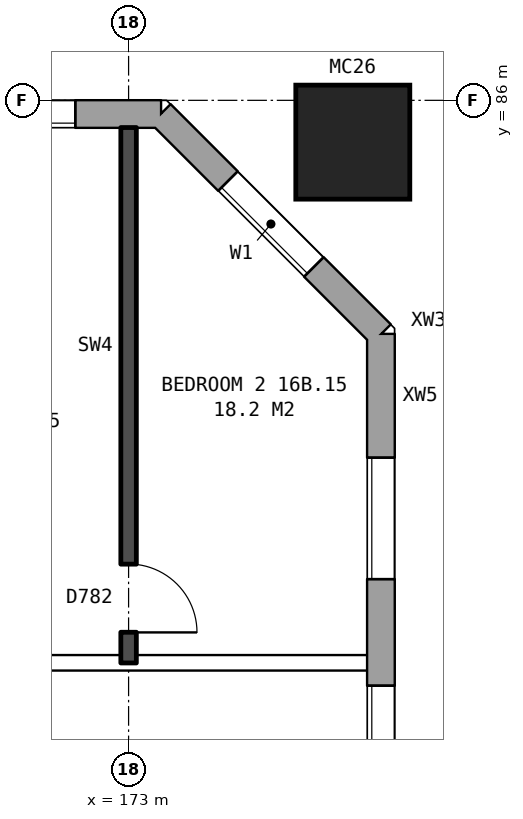
"""IFC4 building model, lengths in metres.
Left out: names, types, materials, properties, quantities, classifications, styles, units other than length and angle.
Written with IfcOpenShell. Run it as: python <this file> out.ifc"""

import sys

from ifc_helpers import new_model, si_unit, direction, frame, frame_2d, origin, origin_2d, place, context, subcontext, project, spatial, rectangle, hollow_rectangle, extrude, element, fill, save


model = new_model("IFC4")
c1 = context("Model", 3, precision=1e-05, world=origin(), true_north=direction((0.0, 1.0)))
c2 = subcontext(c1, "Body", "Model", "MODEL_VIEW")
j1 = project(units=[si_unit("LENGTHUNIT", "METRE"), si_unit("PLANEANGLEUNIT", "RADIAN")], contexts=[c1])
p1 = place(None, origin())
s1 = spatial("IfcSite", under=j1, at=p1, CompositionType="ELEMENT")
p2 = place(p1, origin())
s2 = spatial("IfcBuilding", under=s1, at=p2, CompositionType="ELEMENT")
p3 = place(p2, frame((0.0, 0.0, 59.8)))
s3 = spatial("IfcBuildingStorey", under=s2, at=p3, CompositionType="ELEMENT", Elevation=59.8)
p4 = place(p3, frame((175.95, 85.45, 0.0), z_axis=(0.0, 0.0, 1.0), x_axis=(1.0, 0.0, 0.0)))
e1 = element("IfcColumn", 1, at=p4, inside=s3, PredefinedType="COLUMN", context=c2, shape_type="SweptSolid", body=[
    extrude(hollow_rectangle(XDim=1.5, YDim=1.5, WallThickness=0.08, at=origin_2d()), origin(), (0.0, 0.0, 1.0), 3.1),
])
p5 = place(p3, frame((176.32, 57.075, 0.0), z_axis=(0.0, 0.0, 1.0), x_axis=(0.0, 1.0, 0.0)))
e2 = element("IfcWall", 2, at=p5, inside=s3, PredefinedType="STANDARD", context=c2, shape_type="SweptSolid", body=[
    extrude(rectangle(XDim=25.851, YDim=0.36, at=frame_2d((12.925, 0.0))), origin(), (0.0, 0.0, 1.0), 2.85),
])
p6 = place(p5, frame((1.625, 0.0, 0.8)))
e3 = element("IfcOpeningElement", 3, at=p6, cuts=e2, PredefinedType="OPENING", context=c2, shape_type="SweptSolid", body=[
    extrude(rectangle(XDim=1.6, YDim=1.8, at=frame_2d((0.8, 0.9))), frame((0.0, 0.19, 0.0), z_axis=(0.0, -1.0, 0.0), x_axis=(1.0, 0.0, 0.0)), (0.0, 0.0, 1.0), 0.38),
])
p7 = place(p5, frame((4.625, 0.0, 0.8)))
e4 = element("IfcOpeningElement", 4, at=p7, cuts=e2, PredefinedType="OPENING", context=c2, shape_type="SweptSolid", body=[
    extrude(rectangle(XDim=1.6, YDim=1.8, at=frame_2d((0.8, 0.9))), frame((0.0, 0.19, 0.0), z_axis=(0.0, -1.0, 0.0), x_axis=(1.0, 0.0, 0.0)), (0.0, 0.0, 1.0), 0.38),
])
p8 = place(p5, frame((7.625, 0.0, 0.8)))
e5 = element("IfcOpeningElement", 5, at=p8, cuts=e2, PredefinedType="OPENING", context=c2, shape_type="SweptSolid", body=[
    extrude(rectangle(XDim=1.6, YDim=1.8, at=frame_2d((0.8, 0.9))), frame((0.0, 0.19, 0.0), z_axis=(0.0, -1.0, 0.0), x_axis=(1.0, 0.0, 0.0)), (0.0, 0.0, 1.0), 0.38),
])
p9 = place(p5, frame((10.625, 0.0, 0.8)))
e6 = element("IfcOpeningElement", 6, at=p9, cuts=e2, PredefinedType="OPENING", context=c2, shape_type="SweptSolid", body=[
    extrude(rectangle(XDim=1.6, YDim=1.8, at=frame_2d((0.8, 0.9))), frame((0.0, 0.19, 0.0), z_axis=(0.0, -1.0, 0.0), x_axis=(1.0, 0.0, 0.0)), (0.0, 0.0, 1.0), 0.38),
])
p10 = place(p5, frame((13.625, 0.0, 0.8)))
e7 = element("IfcOpeningElement", 7, at=p10, cuts=e2, PredefinedType="OPENING", context=c2, shape_type="SweptSolid", body=[
    extrude(rectangle(XDim=1.6, YDim=1.8, at=frame_2d((0.8, 0.9))), frame((0.0, 0.19, 0.0), z_axis=(0.0, -1.0, 0.0), x_axis=(1.0, 0.0, 0.0)), (0.0, 0.0, 1.0), 0.38),
])
p11 = place(p5, frame((16.625, 0.0, 0.8)))
e8 = element("IfcOpeningElement", 8, at=p11, cuts=e2, PredefinedType="OPENING", context=c2, shape_type="SweptSolid", body=[
    extrude(rectangle(XDim=1.6, YDim=1.8, at=frame_2d((0.8, 0.9))), frame((0.0, 0.19, 0.0), z_axis=(0.0, -1.0, 0.0), x_axis=(1.0, 0.0, 0.0)), (0.0, 0.0, 1.0), 0.38),
])
p12 = place(p5, frame((19.625, 0.0, 0.8)))
e9 = element("IfcOpeningElement", 9, at=p12, cuts=e2, PredefinedType="OPENING", context=c2, shape_type="SweptSolid", body=[
    extrude(rectangle(XDim=1.6, YDim=1.8, at=frame_2d((0.8, 0.9))), frame((0.0, 0.19, 0.0), z_axis=(0.0, -1.0, 0.0), x_axis=(1.0, 0.0, 0.0)), (0.0, 0.0, 1.0), 0.38),
])
p13 = place(p5, frame((22.625, 0.0, 0.8)))
e10 = element("IfcOpeningElement", 10, at=p13, cuts=e2, PredefinedType="OPENING", context=c2, shape_type="SweptSolid", body=[
    extrude(rectangle(XDim=1.6, YDim=1.8, at=frame_2d((0.8, 0.9))), frame((0.0, 0.19, 0.0), z_axis=(0.0, -1.0, 0.0), x_axis=(1.0, 0.0, 0.0)), (0.0, 0.0, 1.0), 0.38),
])
p14 = place(p3, frame((176.32, 82.925, 0.0), z_axis=(0.0, 0.0, 1.0), x_axis=(-0.707106781187, 0.707106781187, 0.0)))
e11 = element("IfcWall", 11, at=p14, inside=s3, PredefinedType="STANDARD", context=c2, shape_type="SweptSolid", body=[
    extrude(rectangle(XDim=4.094, YDim=0.36, at=frame_2d((2.047, 0.0))), origin(), (0.0, 0.0, 1.0), 2.85),
])
p15 = place(p14, frame((1.247, 0.0, 0.8)))
e12 = element("IfcOpeningElement", 12, at=p15, cuts=e11, PredefinedType="OPENING", context=c2, shape_type="SweptSolid", body=[
    extrude(rectangle(XDim=1.6, YDim=1.8, at=frame_2d((0.8, 0.9))), frame((0.0, 0.19, 0.0), z_axis=(0.0, -1.0, 0.0), x_axis=(1.0, 0.0, 0.0)), (0.0, 0.0, 1.0), 0.38),
])
p16 = place(p3, frame((173.425, 85.82, 0.0), z_axis=(0.0, 0.0, 1.0), x_axis=(-1.0, 0.0, 0.0)))
e13 = element("IfcWall", 13, at=p16, inside=s3, PredefinedType="STANDARD", context=c2, shape_type="SweptSolid", body=[
    extrude(rectangle(XDim=39.351, YDim=0.36, at=frame_2d((19.675, 0.0))), origin(), (0.0, 0.0, 1.0), 2.85),
])
p17 = place(p16, frame((1.125, 0.0, 0.8)))
e14 = element("IfcOpeningElement", 14, at=p17, cuts=e13, PredefinedType="OPENING", context=c2, shape_type="SweptSolid", body=[
    extrude(rectangle(XDim=1.6, YDim=1.8, at=frame_2d((0.8, 0.9))), frame((0.0, 0.19, 0.0), z_axis=(0.0, -1.0, 0.0), x_axis=(1.0, 0.0, 0.0)), (0.0, 0.0, 1.0), 0.38),
])
p18 = place(p16, frame((4.125, 0.0, 0.8)))
e15 = element("IfcOpeningElement", 15, at=p18, cuts=e13, PredefinedType="OPENING", context=c2, shape_type="SweptSolid", body=[
    extrude(rectangle(XDim=1.6, YDim=1.8, at=frame_2d((0.8, 0.9))), frame((0.0, 0.19, 0.0), z_axis=(0.0, -1.0, 0.0), x_axis=(1.0, 0.0, 0.0)), (0.0, 0.0, 1.0), 0.38),
])
p19 = place(p16, frame((7.125, 0.0, 0.8)))
e16 = element("IfcOpeningElement", 16, at=p19, cuts=e13, PredefinedType="OPENING", context=c2, shape_type="SweptSolid", body=[
    extrude(rectangle(XDim=1.6, YDim=1.8, at=frame_2d((0.8, 0.9))), frame((0.0, 0.19, 0.0), z_axis=(0.0, -1.0, 0.0), x_axis=(1.0, 0.0, 0.0)), (0.0, 0.0, 1.0), 0.38),
])
p20 = place(p16, frame((10.125, 0.0, 0.8)))
e17 = element("IfcOpeningElement", 17, at=p20, cuts=e13, PredefinedType="OPENING", context=c2, shape_type="SweptSolid", body=[
    extrude(rectangle(XDim=1.6, YDim=1.8, at=frame_2d((0.8, 0.9))), frame((0.0, 0.19, 0.0), z_axis=(0.0, -1.0, 0.0), x_axis=(1.0, 0.0, 0.0)), (0.0, 0.0, 1.0), 0.38),
])
p21 = place(p16, frame((13.125, 0.0, 0.8)))
e18 = element("IfcOpeningElement", 18, at=p21, cuts=e13, PredefinedType="OPENING", context=c2, shape_type="SweptSolid", body=[
    extrude(rectangle(XDim=1.6, YDim=1.8, at=frame_2d((0.8, 0.9))), frame((0.0, 0.19, 0.0), z_axis=(0.0, -1.0, 0.0), x_axis=(1.0, 0.0, 0.0)), (0.0, 0.0, 1.0), 0.38),
])
p22 = place(p16, frame((15.025, 0.0, 0.8)))
e19 = element("IfcOpeningElement", 19, at=p22, cuts=e13, PredefinedType="OPENING", context=c2, shape_type="SweptSolid", body=[
    extrude(rectangle(XDim=1.0, YDim=1.8, at=frame_2d((0.5, 0.9))), frame((0.0, 0.19, 0.0), z_axis=(0.0, -1.0, 0.0), x_axis=(1.0, 0.0, 0.0)), (0.0, 0.0, 1.0), 0.38),
])
p23 = place(p16, frame((18.625, 0.0, 0.15)))
e20 = element("IfcOpeningElement", 20, at=p23, cuts=e13, PredefinedType="OPENING", context=c2, shape_type="SweptSolid", body=[
    extrude(rectangle(XDim=1.4, YDim=1.2, at=frame_2d((0.7, 0.6))), frame((0.0, 0.19, 0.0), z_axis=(0.0, -1.0, 0.0), x_axis=(1.0, 0.0, 0.0)), (0.0, 0.0, 1.0), 0.38),
])
p24 = place(p16, frame((21.575, 0.0, 1.7)))
e21 = element("IfcOpeningElement", 21, at=p24, cuts=e13, PredefinedType="OPENING", context=c2, shape_type="SweptSolid", body=[
    extrude(rectangle(XDim=0.6, YDim=0.9, at=frame_2d((0.3, 0.45))), frame((0.0, 0.19, 0.0), z_axis=(0.0, -1.0, 0.0), x_axis=(1.0, 0.0, 0.0)), (0.0, 0.0, 1.0), 0.38),
])
p25 = place(p16, frame((25.125, 0.0, 0.8)))
e22 = element("IfcOpeningElement", 22, at=p25, cuts=e13, PredefinedType="OPENING", context=c2, shape_type="SweptSolid", body=[
    extrude(rectangle(XDim=1.6, YDim=1.8, at=frame_2d((0.8, 0.9))), frame((0.0, 0.19, 0.0), z_axis=(0.0, -1.0, 0.0), x_axis=(1.0, 0.0, 0.0)), (0.0, 0.0, 1.0), 0.38),
])
p26 = place(p16, frame((28.125, 0.0, 0.8)))
e23 = element("IfcOpeningElement", 23, at=p26, cuts=e13, PredefinedType="OPENING", context=c2, shape_type="SweptSolid", body=[
    extrude(rectangle(XDim=1.6, YDim=1.8, at=frame_2d((0.8, 0.9))), frame((0.0, 0.19, 0.0), z_axis=(0.0, -1.0, 0.0), x_axis=(1.0, 0.0, 0.0)), (0.0, 0.0, 1.0), 0.38),
])
p27 = place(p16, frame((31.125, 0.0, 0.8)))
e24 = element("IfcOpeningElement", 24, at=p27, cuts=e13, PredefinedType="OPENING", context=c2, shape_type="SweptSolid", body=[
    extrude(rectangle(XDim=1.6, YDim=1.8, at=frame_2d((0.8, 0.9))), frame((0.0, 0.19, 0.0), z_axis=(0.0, -1.0, 0.0), x_axis=(1.0, 0.0, 0.0)), (0.0, 0.0, 1.0), 0.38),
])
p28 = place(p16, frame((34.125, 0.0, 0.8)))
e25 = element("IfcOpeningElement", 25, at=p28, cuts=e13, PredefinedType="OPENING", context=c2, shape_type="SweptSolid", body=[
    extrude(rectangle(XDim=1.6, YDim=1.8, at=frame_2d((0.8, 0.9))), frame((0.0, 0.19, 0.0), z_axis=(0.0, -1.0, 0.0), x_axis=(1.0, 0.0, 0.0)), (0.0, 0.0, 1.0), 0.38),
])
p29 = place(p16, frame((37.125, 0.0, 0.8)))
e26 = element("IfcOpeningElement", 26, at=p29, cuts=e13, PredefinedType="OPENING", context=c2, shape_type="SweptSolid", body=[
    extrude(rectangle(XDim=1.6, YDim=1.8, at=frame_2d((0.8, 0.9))), frame((0.0, 0.19, 0.0), z_axis=(0.0, -1.0, 0.0), x_axis=(1.0, 0.0, 0.0)), (0.0, 0.0, 1.0), 0.38),
])
p30 = place(p16, frame((16.325, 0.0, 1.0)))
e27 = element("IfcOpeningElement", 27, at=p30, cuts=e13, PredefinedType="OPENING", context=c2, shape_type="SweptSolid", body=[
    extrude(rectangle(XDim=0.6, YDim=1.5, at=frame_2d((0.3, 0.75))), frame((0.0, 0.19, 0.0), z_axis=(0.0, -1.0, 0.0), x_axis=(1.0, 0.0, 0.0)), (0.0, 0.0, 1.0), 0.38),
])
p31 = place(p16, frame((17.225, 0.0, 1.7)))
e28 = element("IfcOpeningElement", 28, at=p31, cuts=e13, PredefinedType="OPENING", context=c2, shape_type="SweptSolid", body=[
    extrude(rectangle(XDim=0.6, YDim=0.9, at=frame_2d((0.3, 0.45))), frame((0.0, 0.19, 0.0), z_axis=(0.0, -1.0, 0.0), x_axis=(1.0, 0.0, 0.0)), (0.0, 0.0, 1.0), 0.38),
])
p32 = place(p16, frame((20.325, 0.0, 0.25)))
e29 = element("IfcOpeningElement", 29, at=p32, cuts=e13, PredefinedType="OPENING", context=c2, shape_type="SweptSolid", body=[
    extrude(rectangle(XDim=0.6, YDim=0.9, at=frame_2d((0.3, 0.45))), frame((0.0, 0.19, 0.0), z_axis=(0.0, -1.0, 0.0), x_axis=(1.0, 0.0, 0.0)), (0.0, 0.0, 1.0), 0.38),
])
p33 = place(p16, frame((22.625, 0.0, 0.8)))
e30 = element("IfcOpeningElement", 30, at=p33, cuts=e13, PredefinedType="OPENING", context=c2, shape_type="SweptSolid", body=[
    extrude(rectangle(XDim=1.6, YDim=1.8, at=frame_2d((0.8, 0.9))), frame((0.0, 0.19, 0.0), z_axis=(0.0, -1.0, 0.0), x_axis=(1.0, 0.0, 0.0)), (0.0, 0.0, 1.0), 0.38),
])
p34 = place(p3, frame((155.1, 78.6, 0.0), z_axis=(0.0, 0.0, 1.0), x_axis=(1.0, 0.0, 0.0)))
e31 = element("IfcWall", 31, at=p34, inside=s3, PredefinedType="PARTITIONING", context=c2, shape_type="SweptSolid", body=[
    extrude(rectangle(XDim=21.04, YDim=0.2, at=frame_2d((10.52, 0.0))), origin(), (0.0, 0.0, 1.0), 2.85),
])
p35 = place(p34, frame((2.45, 0.0, 0.0)))
e32 = element("IfcOpeningElement", 32, at=p35, cuts=e31, PredefinedType="OPENING", context=c2, shape_type="SweptSolid", body=[
    extrude(rectangle(XDim=1.0, YDim=2.1, at=frame_2d((0.5, 1.05))), frame((0.0, 0.11, 0.0), z_axis=(0.0, -1.0, 0.0), x_axis=(1.0, 0.0, 0.0)), (0.0, 0.0, 1.0), 0.22),
])
p36 = place(p34, frame((14.4, 0.0, 0.0)))
e33 = element("IfcOpeningElement", 33, at=p36, cuts=e31, PredefinedType="OPENING", context=c2, shape_type="SweptSolid", body=[
    extrude(rectangle(XDim=1.0, YDim=2.1, at=frame_2d((0.5, 1.05))), frame((0.0, 0.11, 0.0), z_axis=(0.0, -1.0, 0.0), x_axis=(1.0, 0.0, 0.0)), (0.0, 0.0, 1.0), 0.22),
])
p37 = place(p3, frame((173.0, 78.6, 0.0), z_axis=(0.0, 0.0, 1.0), x_axis=(0.0, 1.0, 0.0)))
e34 = element("IfcWall", 34, at=p37, inside=s3, PredefinedType="SOLIDWALL", context=c2, shape_type="SweptSolid", body=[
    extrude(rectangle(XDim=7.04, YDim=0.2, at=frame_2d((3.52, 0.0))), origin(), (0.0, 0.0, 1.0), 2.85),
])
p38 = place(p37, frame((0.4, 0.0, 0.0)))
e35 = element("IfcOpeningElement", 35, at=p38, cuts=e34, PredefinedType="OPENING", context=c2, shape_type="SweptSolid", body=[
    extrude(rectangle(XDim=0.9, YDim=2.1, at=frame_2d((0.45, 1.05))), frame((0.0, 0.11, 0.0), z_axis=(0.0, -1.0, 0.0), x_axis=(1.0, 0.0, 0.0)), (0.0, 0.0, 1.0), 0.22),
])
p39 = place(p12, origin())
e36 = element("IfcWindow", 36, at=p39, inside=s3, PartitioningType="SINGLE_PANEL", PredefinedType="WINDOW", context=c2, shape_type="SweptSolid", body=[
    extrude(rectangle(XDim=1.6, YDim=1.8, at=frame_2d((0.8, 0.9))), frame((0.0, 0.15, 0.0), z_axis=(0.0, -1.0, 0.0), x_axis=(1.0, 0.0, 0.0)), (0.0, 0.0, 1.0), 0.06),
])
fill(e9, e36)
p40 = place(p13, origin())
e37 = element("IfcWindow", 37, at=p40, inside=s3, PartitioningType="SINGLE_PANEL", PredefinedType="WINDOW", context=c2, shape_type="SweptSolid", body=[
    extrude(rectangle(XDim=1.6, YDim=1.8, at=frame_2d((0.8, 0.9))), frame((0.0, 0.15, 0.0), z_axis=(0.0, -1.0, 0.0), x_axis=(1.0, 0.0, 0.0)), (0.0, 0.0, 1.0), 0.06),
])
fill(e10, e37)
p41 = place(p15, origin())
e38 = element("IfcWindow", 38, at=p41, inside=s3, PartitioningType="SINGLE_PANEL", PredefinedType="WINDOW", context=c2, shape_type="SweptSolid", body=[
    extrude(rectangle(XDim=1.6, YDim=1.8, at=frame_2d((0.8, 0.9))), frame((0.0, 0.15, 0.0), z_axis=(0.0, -1.0, 0.0), x_axis=(1.0, 0.0, 0.0)), (0.0, 0.0, 1.0), 0.06),
])
fill(e12, e38)
p42 = place(p17, origin())
e39 = element("IfcWindow", 39, at=p42, inside=s3, PartitioningType="SINGLE_PANEL", PredefinedType="WINDOW", context=c2, shape_type="SweptSolid", body=[
    extrude(rectangle(XDim=1.6, YDim=1.8, at=frame_2d((0.8, 0.9))), frame((0.0, 0.15, 0.0), z_axis=(0.0, -1.0, 0.0), x_axis=(1.0, 0.0, 0.0)), (0.0, 0.0, 1.0), 0.06),
])
fill(e14, e39)
p43 = place(p38, frame((0.9, 0.0, 0.0), z_axis=(0.0, 0.0, 1.0), x_axis=(-1.0, 0.0, 0.0)))
e40 = element("IfcDoor", 40, at=p43, inside=s3, OperationType="SINGLE_SWING_RIGHT", PredefinedType="DOOR", context=c2, shape_type="SweptSolid", body=[
    extrude(rectangle(XDim=0.9, YDim=2.1, at=frame_2d((0.45, 1.05))), frame((0.0, 0.025, 0.0), z_axis=(0.0, -1.0, 0.0), x_axis=(1.0, 0.0, 0.0)), (0.0, 0.0, 1.0), 0.05),
])
fill(e35, e40)
save(model, sys.argv[1])
